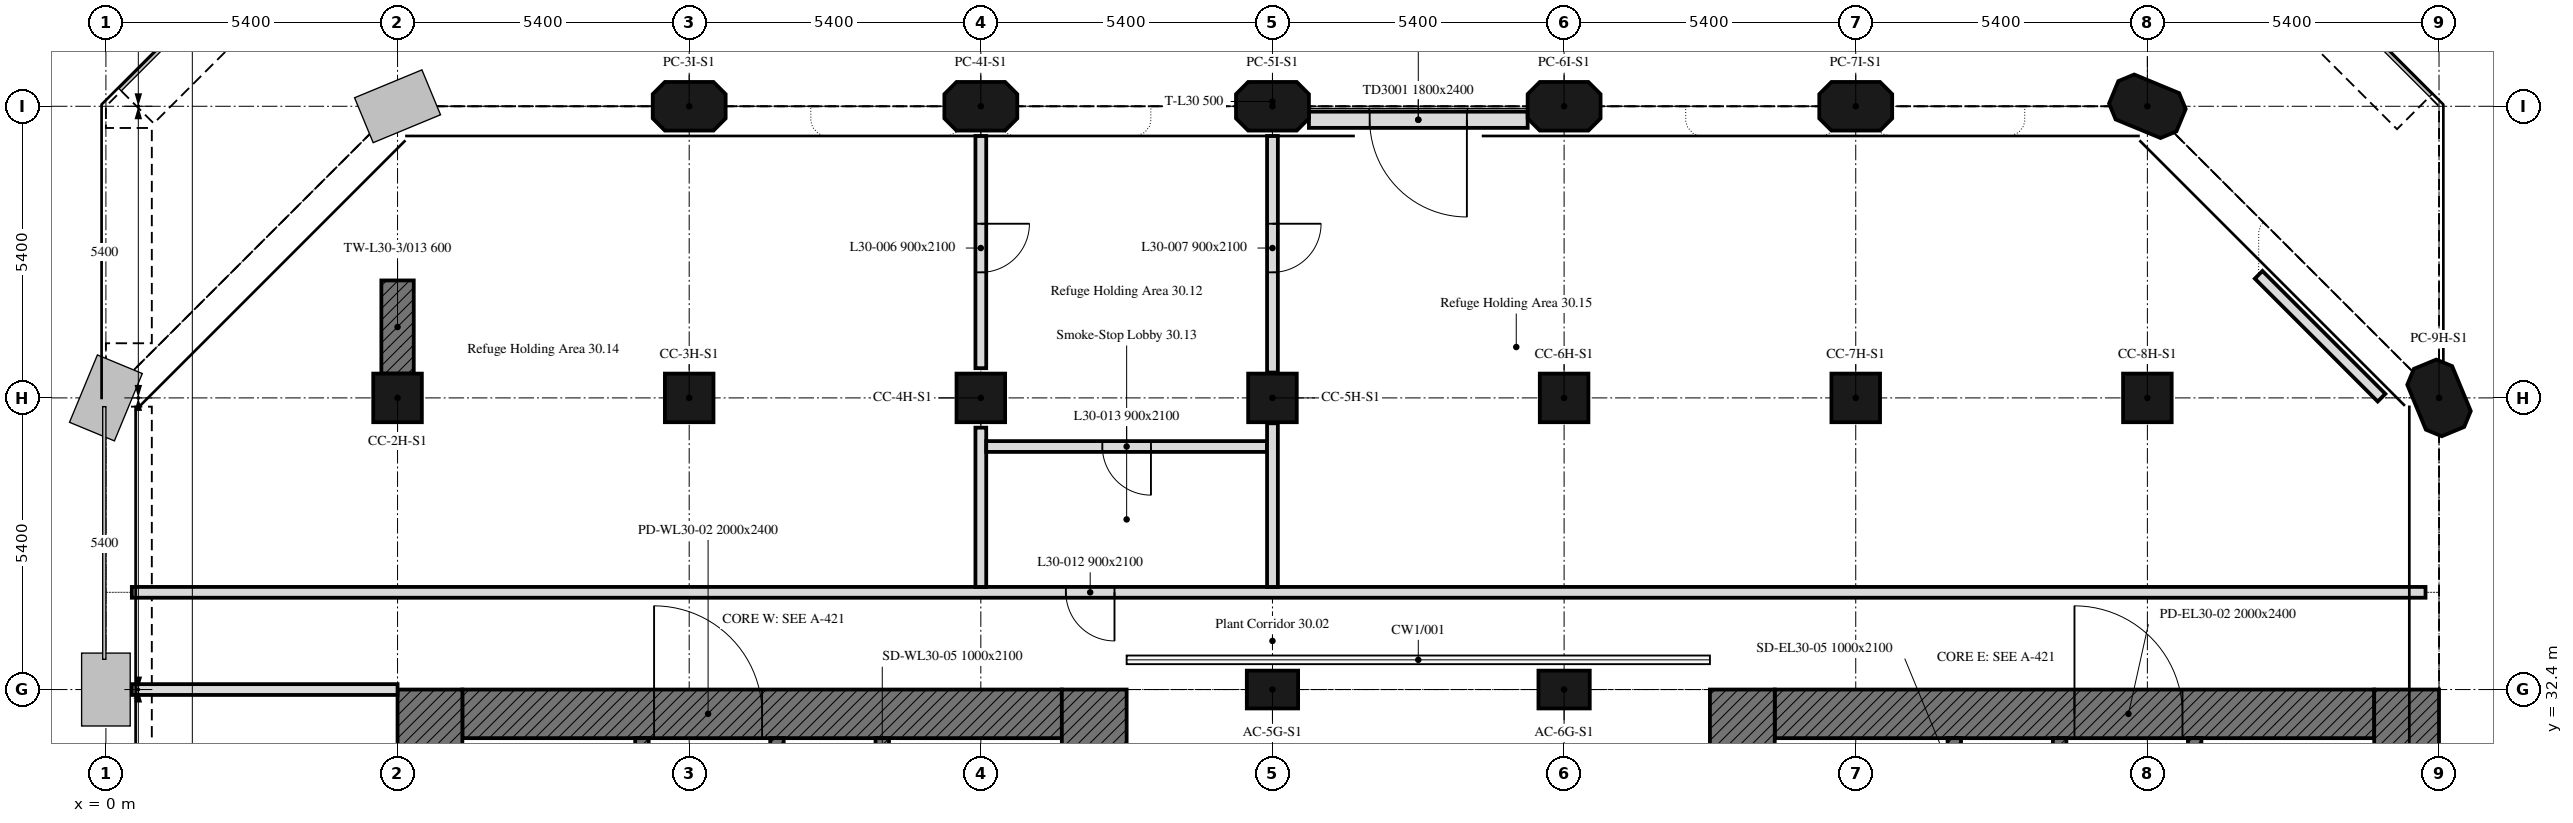
"""IFC4 building model, lengths in metres.
Left out: names, types, materials, properties, quantities, classifications, styles, units other than length and angle.
Written with IfcOpenShell. Run it as: python <this file> out.ifc"""

import sys

from ifc_helpers import new_model, si_unit, direction, frame, frame_2d, origin, origin_2d, place, context, subcontext, project, spatial, polyline, rectangle, outline, extrude, element, fill, save


model = new_model("IFC4")
c1 = context("Model", 3, precision=1e-05, world=origin(), true_north=direction((0.0, 1.0)))
c2 = subcontext(c1, "Body", "Model", "MODEL_VIEW")
j1 = project(units=[si_unit("LENGTHUNIT", "METRE"), si_unit("PLANEANGLEUNIT", "RADIAN")], contexts=[c1])
p1 = place(None, origin())
s1 = spatial("IfcSite", under=j1, at=p1, CompositionType="ELEMENT")
p2 = place(p1, origin())
s2 = spatial("IfcBuilding", under=s1, at=p2, CompositionType="ELEMENT")
p3 = place(p2, frame((0.0, 0.0, 125.8)))
s3 = spatial("IfcBuildingStorey", under=s2, at=p3, CompositionType="ELEMENT", Elevation=125.8)
for number, where, z_axis, x_axis in (
    (1, (21.6, 32.4, 0.0), (0.0, 0.0, 1.0), (1.0, 0.0, 0.0)),
    (2, (27.0, 32.4, 0.0), (0.0, 0.0, 1.0), (1.0, 0.0, 0.0)),
):
    element("IfcColumn", number, at=place(p3, frame(where, z_axis=z_axis, x_axis=x_axis)), inside=s3, PredefinedType="COLUMN", context=c2, shape_type="SweptSolid", body=[
        extrude(rectangle(XDim=0.95, YDim=0.7, at=origin_2d()), origin(), (0.0, 0.0, 1.0), 4.5),
    ])
for number, where, z_axis, x_axis in (
    (3, (5.4, 37.8, 0.0), (0.0, 0.0, 1.0), (1.0, 0.0, 0.0)),
    (4, (10.8, 37.8, 0.0), (0.0, 0.0, 1.0), (1.0, 0.0, 0.0)),
    (5, (16.2, 37.8, 0.0), (0.0, 0.0, 1.0), (1.0, 0.0, 0.0)),
    (6, (21.6, 37.8, 0.0), (0.0, 0.0, 1.0), (1.0, 0.0, 0.0)),
    (7, (27.0, 37.8, 0.0), (0.0, 0.0, 1.0), (1.0, 0.0, 0.0)),
    (8, (32.4, 37.8, 0.0), (0.0, 0.0, 1.0), (1.0, 0.0, 0.0)),
    (9, (37.8, 37.8, 0.0), (0.0, 0.0, 1.0), (1.0, 0.0, 0.0)),
):
    element("IfcColumn", number, at=place(p3, frame(where, z_axis=z_axis, x_axis=x_axis)), inside=s3, PredefinedType="COLUMN", context=c2, shape_type="SweptSolid", body=[
        extrude(rectangle(XDim=0.9, YDim=0.9, at=origin_2d()), origin(), (0.0, 0.0, 1.0), 4.5),
    ])
for number, where, z_axis, x_axis in (
    (10, (43.2, 37.8, 0.0), (0.0, 0.0, 1.0), (-0.383, 0.924, 0.0)),
    (11, (10.8, 43.2, 0.0), (0.0, 0.0, 1.0), (1.0, 0.0, 0.0)),
    (12, (16.2, 43.2, 0.0), (0.0, 0.0, 1.0), (1.0, 0.0, 0.0)),
    (13, (21.6, 43.2, 0.0), (0.0, 0.0, 1.0), (1.0, 0.0, 0.0)),
    (14, (27.0, 43.2, 0.0), (0.0, 0.0, 1.0), (1.0, 0.0, 0.0)),
    (15, (32.4, 43.2, 0.0), (0.0, 0.0, 1.0), (1.0, 0.0, 0.0)),
    (16, (37.8, 43.2, 0.0), (0.0, 0.0, 1.0), (-0.924, 0.383, 0.0)),
):
    element("IfcColumn", number, at=place(p3, frame(where, z_axis=z_axis, x_axis=x_axis)), inside=s3, PredefinedType="COLUMN", context=c2, shape_type="SweptSolid", body=[
        extrude(outline(polyline([(-0.45, -0.45), (0.45, -0.45), (0.675, -0.225), (0.675, 0.225), (0.45, 0.45), (-0.45, 0.45), (-0.675, 0.225), (-0.675, -0.225), (-0.45, -0.45)])), origin(), (0.0, 0.0, 1.0), 4.5),
    ])
p4 = place(p3, frame((5.4, 38.25, 0.0), z_axis=(0.0, 0.0, 1.0), x_axis=(0.0, 1.0, 0.0)))
e17 = element("IfcWall", 17, at=p4, inside=s3, PredefinedType="SHEAR", context=c2, shape_type="SweptSolid", body=[
    extrude(rectangle(XDim=1.725, YDim=0.6, at=frame_2d((0.863, 0.0))), origin(), (0.0, 0.0, 1.0), 4.5),
])
p5 = place(p3, frame((26.325, 42.95, 0.0), z_axis=(0.0, 0.0, 1.0), x_axis=(-1.0, 0.0, 0.0)))
e18 = element("IfcWall", 18, at=p5, inside=s3, PredefinedType="SOLIDWALL", context=c2, shape_type="SweptSolid", body=[
    extrude(rectangle(XDim=4.05, YDim=0.3, at=frame_2d((2.025, 0.0))), origin(), (0.0, 0.0, 1.0), 4.5),
])
p6 = place(p5, frame((1.125, 0.0, 0.0)))
e19 = element("IfcOpeningElement", 19, at=p6, cuts=e18, PredefinedType="OPENING", context=c2, shape_type="SweptSolid", body=[
    extrude(rectangle(XDim=1.8, YDim=2.4, at=frame_2d((0.9, 1.2))), frame((0.0, 0.16, 0.0), z_axis=(0.0, -1.0, 0.0), x_axis=(1.0, 0.0, 0.0)), (0.0, 0.0, 1.0), 0.32),
])
p7 = place(p3, frame((6.6, 31.95, 0.0), z_axis=(0.0, 0.0, 1.0), x_axis=(1.0, 0.0, 0.0)))
e20 = element("IfcWall", 20, at=p7, inside=s3, PredefinedType="SOLIDWALL", context=c2, shape_type="SweptSolid", body=[
    extrude(rectangle(XDim=11.1, YDim=0.9, at=frame_2d((5.55, 0.0))), origin(), (0.0, 0.0, 1.0), 4.5),
])
p8 = place(p7, frame((3.55, 0.0, 0.0)))
e21 = element("IfcOpeningElement", 21, at=p8, cuts=e20, PredefinedType="OPENING", context=c2, shape_type="SweptSolid", body=[
    extrude(rectangle(XDim=2.0, YDim=2.4, at=frame_2d((1.0, 1.2))), frame((0.0, 0.45, 0.0), z_axis=(0.0, -1.0, 0.0), x_axis=(1.0, 0.0, 0.0)), (0.0, 0.0, 1.0), 0.9),
])
for number, where, z_axis, x_axis in (
    (22, (6.0, 16.2, 0.0), (0.0, 0.0, 1.0), (0.0, 1.0, 0.0)),
    (23, (18.3, 32.4, 0.0), (0.0, 0.0, 1.0), (0.0, -1.0, 0.0)),
):
    element("IfcWall", number, at=place(p3, frame(where, z_axis=z_axis, x_axis=x_axis)), inside=s3, PredefinedType="SOLIDWALL", context=c2, shape_type="SweptSolid", body=[
        extrude(rectangle(XDim=16.2, YDim=1.2, at=frame_2d((8.1, 0.0))), origin(), (0.0, 0.0, 1.0), 4.5),
    ])
p9 = place(p3, frame((9.925, 17.1, 0.0), z_axis=(0.0, 0.0, 1.0), x_axis=(0.0, 1.0, 0.0)))
e24 = element("IfcWall", 24, at=p9, inside=s3, PredefinedType="SOLIDWALL", context=c2, shape_type="SweptSolid", body=[
    extrude(rectangle(XDim=14.4, YDim=0.25, at=frame_2d((7.2, 0.0))), origin(), (0.0, 0.0, 1.0), 4.5),
])
p10 = place(p9, frame((4.6, 0.0, 0.0)))
e25 = element("IfcOpeningElement", 25, at=p10, cuts=e24, PredefinedType="OPENING", context=c2, shape_type="SweptSolid", body=[
    extrude(rectangle(XDim=1.0, YDim=2.1, at=frame_2d((0.5, 1.05))), frame((0.0, 0.125, 0.0), z_axis=(0.0, -1.0, 0.0), x_axis=(1.0, 0.0, 0.0)), (0.0, 0.0, 1.0), 0.25),
])
p11 = place(p9, frame((7.062, 0.0, 0.0)))
e26 = element("IfcOpeningElement", 26, at=p11, cuts=e24, PredefinedType="OPENING", context=c2, shape_type="SweptSolid", body=[
    extrude(rectangle(XDim=1.2, YDim=2.1, at=frame_2d((0.6, 1.05))), frame((0.0, 0.125, 0.0), z_axis=(0.0, -1.0, 0.0), x_axis=(1.0, 0.0, 0.0)), (0.0, 0.0, 1.0), 0.25),
])
p12 = place(p3, frame((14.375, 17.1, 0.0), z_axis=(0.0, 0.0, 1.0), x_axis=(0.0, 1.0, 0.0)))
e27 = element("IfcWall", 27, at=p12, inside=s3, PredefinedType="SOLIDWALL", context=c2, shape_type="SweptSolid", body=[
    extrude(rectangle(XDim=14.4, YDim=0.25, at=frame_2d((7.2, 0.0))), origin(), (0.0, 0.0, 1.0), 4.5),
])
p13 = place(p12, frame((13.15, 0.0, 0.0)))
e28 = element("IfcOpeningElement", 28, at=p13, cuts=e27, PredefinedType="OPENING", context=c2, shape_type="SweptSolid", body=[
    extrude(rectangle(XDim=1.0, YDim=2.1, at=frame_2d((0.5, 1.05))), frame((0.0, 0.125, 0.0), z_axis=(0.0, -1.0, 0.0), x_axis=(1.0, 0.0, 0.0)), (0.0, 0.0, 1.0), 0.25),
])
p14 = place(p12, frame((3.25, 0.0, 0.0)))
e29 = element("IfcOpeningElement", 29, at=p14, cuts=e27, PredefinedType="OPENING", context=c2, shape_type="SweptSolid", body=[
    extrude(rectangle(XDim=0.9, YDim=2.1, at=frame_2d((0.45, 1.05))), frame((0.0, 0.125, 0.0), z_axis=(0.0, -1.0, 0.0), x_axis=(1.0, 0.0, 0.0)), (0.0, 0.0, 1.0), 0.25),
])
p15 = place(p3, frame((12.425, 29.4, 0.0), z_axis=(0.0, 0.0, 1.0), x_axis=(0.0, 1.0, 0.0)))
e30 = element("IfcWall", 30, at=p15, inside=s3, PredefinedType="SOLIDWALL", context=c2, shape_type="SweptSolid", body=[
    extrude(rectangle(XDim=2.1, YDim=0.25, at=frame_2d((1.05, 0.0))), origin(), (0.0, 0.0, 1.0), 4.5),
])
p16 = place(p15, frame((0.5, 0.0, 0.0)))
e31 = element("IfcOpeningElement", 31, at=p16, cuts=e30, PredefinedType="OPENING", context=c2, shape_type="SweptSolid", body=[
    extrude(rectangle(XDim=1.0, YDim=2.1, at=frame_2d((0.5, 1.05))), frame((0.0, 0.125, 0.0), z_axis=(0.0, -1.0, 0.0), x_axis=(1.0, 0.0, 0.0)), (0.0, 0.0, 1.0), 0.25),
])
p17 = place(p3, frame((30.9, 31.95, 0.0), z_axis=(0.0, 0.0, 1.0), x_axis=(1.0, 0.0, 0.0)))
e32 = element("IfcWall", 32, at=p17, inside=s3, PredefinedType="SOLIDWALL", context=c2, shape_type="SweptSolid", body=[
    extrude(rectangle(XDim=11.1, YDim=0.9, at=frame_2d((5.55, 0.0))), origin(), (0.0, 0.0, 1.0), 4.5),
])
p18 = place(p17, frame((5.55, 0.0, 0.0)))
e33 = element("IfcOpeningElement", 33, at=p18, cuts=e32, PredefinedType="OPENING", context=c2, shape_type="SweptSolid", body=[
    extrude(rectangle(XDim=2.0, YDim=2.4, at=frame_2d((1.0, 1.2))), frame((0.0, 0.45, 0.0), z_axis=(0.0, -1.0, 0.0), x_axis=(1.0, 0.0, 0.0)), (0.0, 0.0, 1.0), 0.9),
])
for number, where, z_axis, x_axis in (
    (34, (42.6, 32.4, 0.0), (0.0, 0.0, 1.0), (0.0, -1.0, 0.0)),
    (35, (30.3, 16.2, 0.0), (0.0, 0.0, 1.0), (0.0, 1.0, 0.0)),
):
    element("IfcWall", number, at=place(p3, frame(where, z_axis=z_axis, x_axis=x_axis)), inside=s3, PredefinedType="SOLIDWALL", context=c2, shape_type="SweptSolid", body=[
        extrude(rectangle(XDim=16.2, YDim=1.2, at=frame_2d((8.1, 0.0))), origin(), (0.0, 0.0, 1.0), 4.5),
    ])
p19 = place(p3, frame((38.675, 17.1, 0.0), z_axis=(0.0, 0.0, 1.0), x_axis=(0.0, 1.0, 0.0)))
e36 = element("IfcWall", 36, at=p19, inside=s3, PredefinedType="SOLIDWALL", context=c2, shape_type="SweptSolid", body=[
    extrude(rectangle(XDim=14.4, YDim=0.25, at=frame_2d((7.2, 0.0))), origin(), (0.0, 0.0, 1.0), 4.5),
])
p20 = place(p19, frame((4.6, 0.0, 0.0)))
e37 = element("IfcOpeningElement", 37, at=p20, cuts=e36, PredefinedType="OPENING", context=c2, shape_type="SweptSolid", body=[
    extrude(rectangle(XDim=1.0, YDim=2.1, at=frame_2d((0.5, 1.05))), frame((0.0, 0.125, 0.0), z_axis=(0.0, -1.0, 0.0), x_axis=(1.0, 0.0, 0.0)), (0.0, 0.0, 1.0), 0.25),
])
p21 = place(p19, frame((7.062, 0.0, 0.0)))
e38 = element("IfcOpeningElement", 38, at=p21, cuts=e36, PredefinedType="OPENING", context=c2, shape_type="SweptSolid", body=[
    extrude(rectangle(XDim=1.2, YDim=2.1, at=frame_2d((0.6, 1.05))), frame((0.0, 0.125, 0.0), z_axis=(0.0, -1.0, 0.0), x_axis=(1.0, 0.0, 0.0)), (0.0, 0.0, 1.0), 0.25),
])
p22 = place(p3, frame((34.225, 17.1, 0.0), z_axis=(0.0, 0.0, 1.0), x_axis=(0.0, 1.0, 0.0)))
e39 = element("IfcWall", 39, at=p22, inside=s3, PredefinedType="SOLIDWALL", context=c2, shape_type="SweptSolid", body=[
    extrude(rectangle(XDim=14.4, YDim=0.25, at=frame_2d((7.2, 0.0))), origin(), (0.0, 0.0, 1.0), 4.5),
])
p23 = place(p22, frame((13.15, 0.0, 0.0)))
e40 = element("IfcOpeningElement", 40, at=p23, cuts=e39, PredefinedType="OPENING", context=c2, shape_type="SweptSolid", body=[
    extrude(rectangle(XDim=1.0, YDim=2.1, at=frame_2d((0.5, 1.05))), frame((0.0, 0.125, 0.0), z_axis=(0.0, -1.0, 0.0), x_axis=(1.0, 0.0, 0.0)), (0.0, 0.0, 1.0), 0.25),
])
p24 = place(p22, frame((3.25, 0.0, 0.0)))
e41 = element("IfcOpeningElement", 41, at=p24, cuts=e39, PredefinedType="OPENING", context=c2, shape_type="SweptSolid", body=[
    extrude(rectangle(XDim=0.9, YDim=2.1, at=frame_2d((0.45, 1.05))), frame((0.0, 0.125, 0.0), z_axis=(0.0, -1.0, 0.0), x_axis=(1.0, 0.0, 0.0)), (0.0, 0.0, 1.0), 0.25),
])
p25 = place(p3, frame((36.175, 29.4, 0.0), z_axis=(0.0, 0.0, 1.0), x_axis=(0.0, 1.0, 0.0)))
e42 = element("IfcWall", 42, at=p25, inside=s3, PredefinedType="SOLIDWALL", context=c2, shape_type="SweptSolid", body=[
    extrude(rectangle(XDim=2.1, YDim=0.25, at=frame_2d((1.05, 0.0))), origin(), (0.0, 0.0, 1.0), 4.5),
])
p26 = place(p25, frame((0.5, 0.0, 0.0)))
e43 = element("IfcOpeningElement", 43, at=p26, cuts=e42, PredefinedType="OPENING", context=c2, shape_type="SweptSolid", body=[
    extrude(rectangle(XDim=1.0, YDim=2.1, at=frame_2d((0.5, 1.05))), frame((0.0, 0.125, 0.0), z_axis=(0.0, -1.0, 0.0), x_axis=(1.0, 0.0, 0.0)), (0.0, 0.0, 1.0), 0.25),
])
p27 = place(p3, frame((42.95, 34.2, 0.0), z_axis=(0.0, 0.0, 1.0), x_axis=(-1.0, 0.0, 0.0)))
e44 = element("IfcWall", 44, at=p27, inside=s3, PredefinedType="PARTITIONING", context=c2, shape_type="SweptSolid", body=[
    extrude(rectangle(XDim=42.47, YDim=0.2, at=frame_2d((21.235, 0.0))), origin(), (0.0, 0.0, 1.0), 4.5),
])
p28 = place(p27, frame((24.275, 0.0, 0.0)))
e45 = element("IfcOpeningElement", 45, at=p28, cuts=e44, PredefinedType="OPENING", context=c2, shape_type="SweptSolid", body=[
    extrude(rectangle(XDim=0.9, YDim=2.1, at=frame_2d((0.45, 1.05))), frame((0.0, 0.1, 0.0), z_axis=(0.0, -1.0, 0.0), x_axis=(1.0, 0.0, 0.0)), (0.0, 0.0, 1.0), 0.2),
])
p29 = place(p3, frame((0.48, 32.4, 0.0), z_axis=(0.0, 0.0, 1.0), x_axis=(1.0, 0.0, 0.0)))
e46 = element("IfcWall", 46, at=p29, inside=s3, PredefinedType="PARTITIONING", context=c2, shape_type="SweptSolid", body=[
    extrude(rectangle(XDim=4.92, YDim=0.2, at=frame_2d((2.46, 0.0))), origin(), (0.0, 0.0, 1.0), 3.75),
])
p30 = place(p3, frame((16.2, 42.65, 0.0), z_axis=(0.0, 0.0, 1.0), x_axis=(0.0, -1.0, 0.0)))
e47 = element("IfcWall", 47, at=p30, inside=s3, PredefinedType="PARTITIONING", context=c2, shape_type="SweptSolid", body=[
    extrude(rectangle(XDim=4.299, YDim=0.2, at=frame_2d((2.15, 0.0))), origin(), (0.0, 0.0, 1.0), 4.5),
])
p31 = place(p30, frame((1.625, 0.0, 0.0)))
e48 = element("IfcOpeningElement", 48, at=p31, cuts=e47, PredefinedType="OPENING", context=c2, shape_type="SweptSolid", body=[
    extrude(rectangle(XDim=0.9, YDim=2.1, at=frame_2d((0.45, 1.05))), frame((0.0, 0.1, 0.0), z_axis=(0.0, -1.0, 0.0), x_axis=(1.0, 0.0, 0.0)), (0.0, 0.0, 1.0), 0.2),
])
p32 = place(p3, frame((16.2, 37.249, 0.0), z_axis=(0.0, 0.0, 1.0), x_axis=(0.0, -1.0, 0.0)))
e49 = element("IfcWall", 49, at=p32, inside=s3, PredefinedType="PARTITIONING", context=c2, shape_type="SweptSolid", body=[
    extrude(rectangle(XDim=2.949, YDim=0.2, at=frame_2d((1.475, 0.0))), origin(), (0.0, 0.0, 1.0), 4.5),
])
p33 = place(p3, frame((21.6, 42.65, 0.0), z_axis=(0.0, 0.0, 1.0), x_axis=(0.0, -1.0, 0.0)))
e50 = element("IfcWall", 50, at=p33, inside=s3, PredefinedType="PARTITIONING", context=c2, shape_type="SweptSolid", body=[
    extrude(rectangle(XDim=4.38, YDim=0.2, at=frame_2d((2.19, 0.0))), origin(), (0.0, 0.0, 1.0), 4.5),
])
p34 = place(p33, frame((1.625, 0.0, 0.0)))
e51 = element("IfcOpeningElement", 51, at=p34, cuts=e50, PredefinedType="OPENING", context=c2, shape_type="SweptSolid", body=[
    extrude(rectangle(XDim=0.9, YDim=2.1, at=frame_2d((0.45, 1.05))), frame((0.0, 0.1, 0.0), z_axis=(0.0, -1.0, 0.0), x_axis=(1.0, 0.0, 0.0)), (0.0, 0.0, 1.0), 0.2),
])
p35 = place(p3, frame((21.5, 36.9, 0.0), z_axis=(0.0, 0.0, 1.0), x_axis=(-1.0, 0.0, 0.0)))
e52 = element("IfcWall", 52, at=p35, inside=s3, PredefinedType="PARTITIONING", context=c2, shape_type="SweptSolid", body=[
    extrude(rectangle(XDim=5.2, YDim=0.2, at=frame_2d((2.6, 0.0))), origin(), (0.0, 0.0, 1.0), 4.5),
])
p36 = place(p35, frame((2.15, 0.0, 0.0)))
e53 = element("IfcOpeningElement", 53, at=p36, cuts=e52, PredefinedType="OPENING", context=c2, shape_type="SweptSolid", body=[
    extrude(rectangle(XDim=0.9, YDim=2.1, at=frame_2d((0.45, 1.05))), frame((0.0, 0.1, 0.0), z_axis=(0.0, -1.0, 0.0), x_axis=(1.0, 0.0, 0.0)), (0.0, 0.0, 1.0), 0.2),
])
p37 = place(p3, frame((21.6, 37.33, 0.0), z_axis=(0.0, 0.0, 1.0), x_axis=(0.0, -1.0, 0.0)))
e54 = element("IfcWall", 54, at=p37, inside=s3, PredefinedType="PARTITIONING", context=c2, shape_type="SweptSolid", body=[
    extrude(rectangle(XDim=3.03, YDim=0.2, at=frame_2d((1.515, 0.0))), origin(), (0.0, 0.0, 1.0), 4.5),
])
p38 = place(p3, frame((39.86, 40.079, 0.0), z_axis=(0.0, 0.0, 1.0), x_axis=(0.707106781187, -0.707106781187, 0.0)))
e55 = element("IfcWall", 55, at=p38, inside=s3, PredefinedType="PARTITIONING", context=c2, shape_type="SweptSolid", body=[
    extrude(rectangle(XDim=3.218, YDim=0.2, at=frame_2d((1.609, 0.0))), origin(), (0.0, 0.0, 1.0), 4.5),
])
p39 = place(p6, origin())
e56 = element("IfcDoor", 56, at=p39, inside=s3, OperationType="DOUBLE_DOOR_DOUBLE_SWING", PredefinedType="DOOR", context=c2, shape_type="SweptSolid", body=[
    extrude(rectangle(XDim=1.8, YDim=2.4, at=frame_2d((0.9, 1.2))), frame((0.0, 0.025, 0.0), z_axis=(0.0, -1.0, 0.0), x_axis=(1.0, 0.0, 0.0)), (0.0, 0.0, 1.0), 0.05),
])
fill(e19, e56)
p40 = place(p8, origin())
e57 = element("IfcDoor", 57, at=p40, inside=s3, OperationType="DOUBLE_DOOR_SINGLE_SWING", PredefinedType="DOOR", context=c2, shape_type="SweptSolid", body=[
    extrude(rectangle(XDim=2.0, YDim=2.4, at=frame_2d((1.0, 1.2))), frame((0.0, 0.025, 0.0), z_axis=(0.0, -1.0, 0.0), x_axis=(1.0, 0.0, 0.0)), (0.0, 0.0, 1.0), 0.05),
])
fill(e21, e57)
p41 = place(p18, origin())
e58 = element("IfcDoor", 58, at=p41, inside=s3, OperationType="DOUBLE_DOOR_SINGLE_SWING", PredefinedType="DOOR", context=c2, shape_type="SweptSolid", body=[
    extrude(rectangle(XDim=2.0, YDim=2.4, at=frame_2d((1.0, 1.2))), frame((0.0, 0.025, 0.0), z_axis=(0.0, -1.0, 0.0), x_axis=(1.0, 0.0, 0.0)), (0.0, 0.0, 1.0), 0.05),
])
fill(e33, e58)
p42 = place(p31, origin())
e59 = element("IfcDoor", 59, at=p42, inside=s3, OperationType="SINGLE_SWING_RIGHT", PredefinedType="DOOR", context=c2, shape_type="SweptSolid", body=[
    extrude(rectangle(XDim=0.9, YDim=2.1, at=frame_2d((0.45, 1.05))), frame((0.0, 0.025, 0.0), z_axis=(0.0, -1.0, 0.0), x_axis=(1.0, 0.0, 0.0)), (0.0, 0.0, 1.0), 0.05),
])
fill(e48, e59)
p43 = place(p34, origin())
e60 = element("IfcDoor", 60, at=p43, inside=s3, OperationType="SINGLE_SWING_LEFT", PredefinedType="DOOR", context=c2, shape_type="SweptSolid", body=[
    extrude(rectangle(XDim=0.9, YDim=2.1, at=frame_2d((0.45, 1.05))), frame((0.0, 0.025, 0.0), z_axis=(0.0, -1.0, 0.0), x_axis=(1.0, 0.0, 0.0)), (0.0, 0.0, 1.0), 0.05),
])
fill(e51, e60)
p44 = place(p28, origin())
e61 = element("IfcDoor", 61, at=p44, inside=s3, OperationType="SINGLE_SWING_LEFT", PredefinedType="DOOR", context=c2, shape_type="SweptSolid", body=[
    extrude(rectangle(XDim=0.9, YDim=2.1, at=frame_2d((0.45, 1.05))), frame((0.0, 0.025, 0.0), z_axis=(0.0, -1.0, 0.0), x_axis=(1.0, 0.0, 0.0)), (0.0, 0.0, 1.0), 0.05),
])
fill(e45, e61)
p45 = place(p36, origin())
e62 = element("IfcDoor", 62, at=p45, inside=s3, OperationType="SINGLE_SWING_LEFT", PredefinedType="DOOR", context=c2, shape_type="SweptSolid", body=[
    extrude(rectangle(XDim=0.9, YDim=2.1, at=frame_2d((0.45, 1.05))), frame((0.0, 0.025, 0.0), z_axis=(0.0, -1.0, 0.0), x_axis=(1.0, 0.0, 0.0)), (0.0, 0.0, 1.0), 0.05),
])
fill(e53, e62)
save(model, sys.argv[1])
